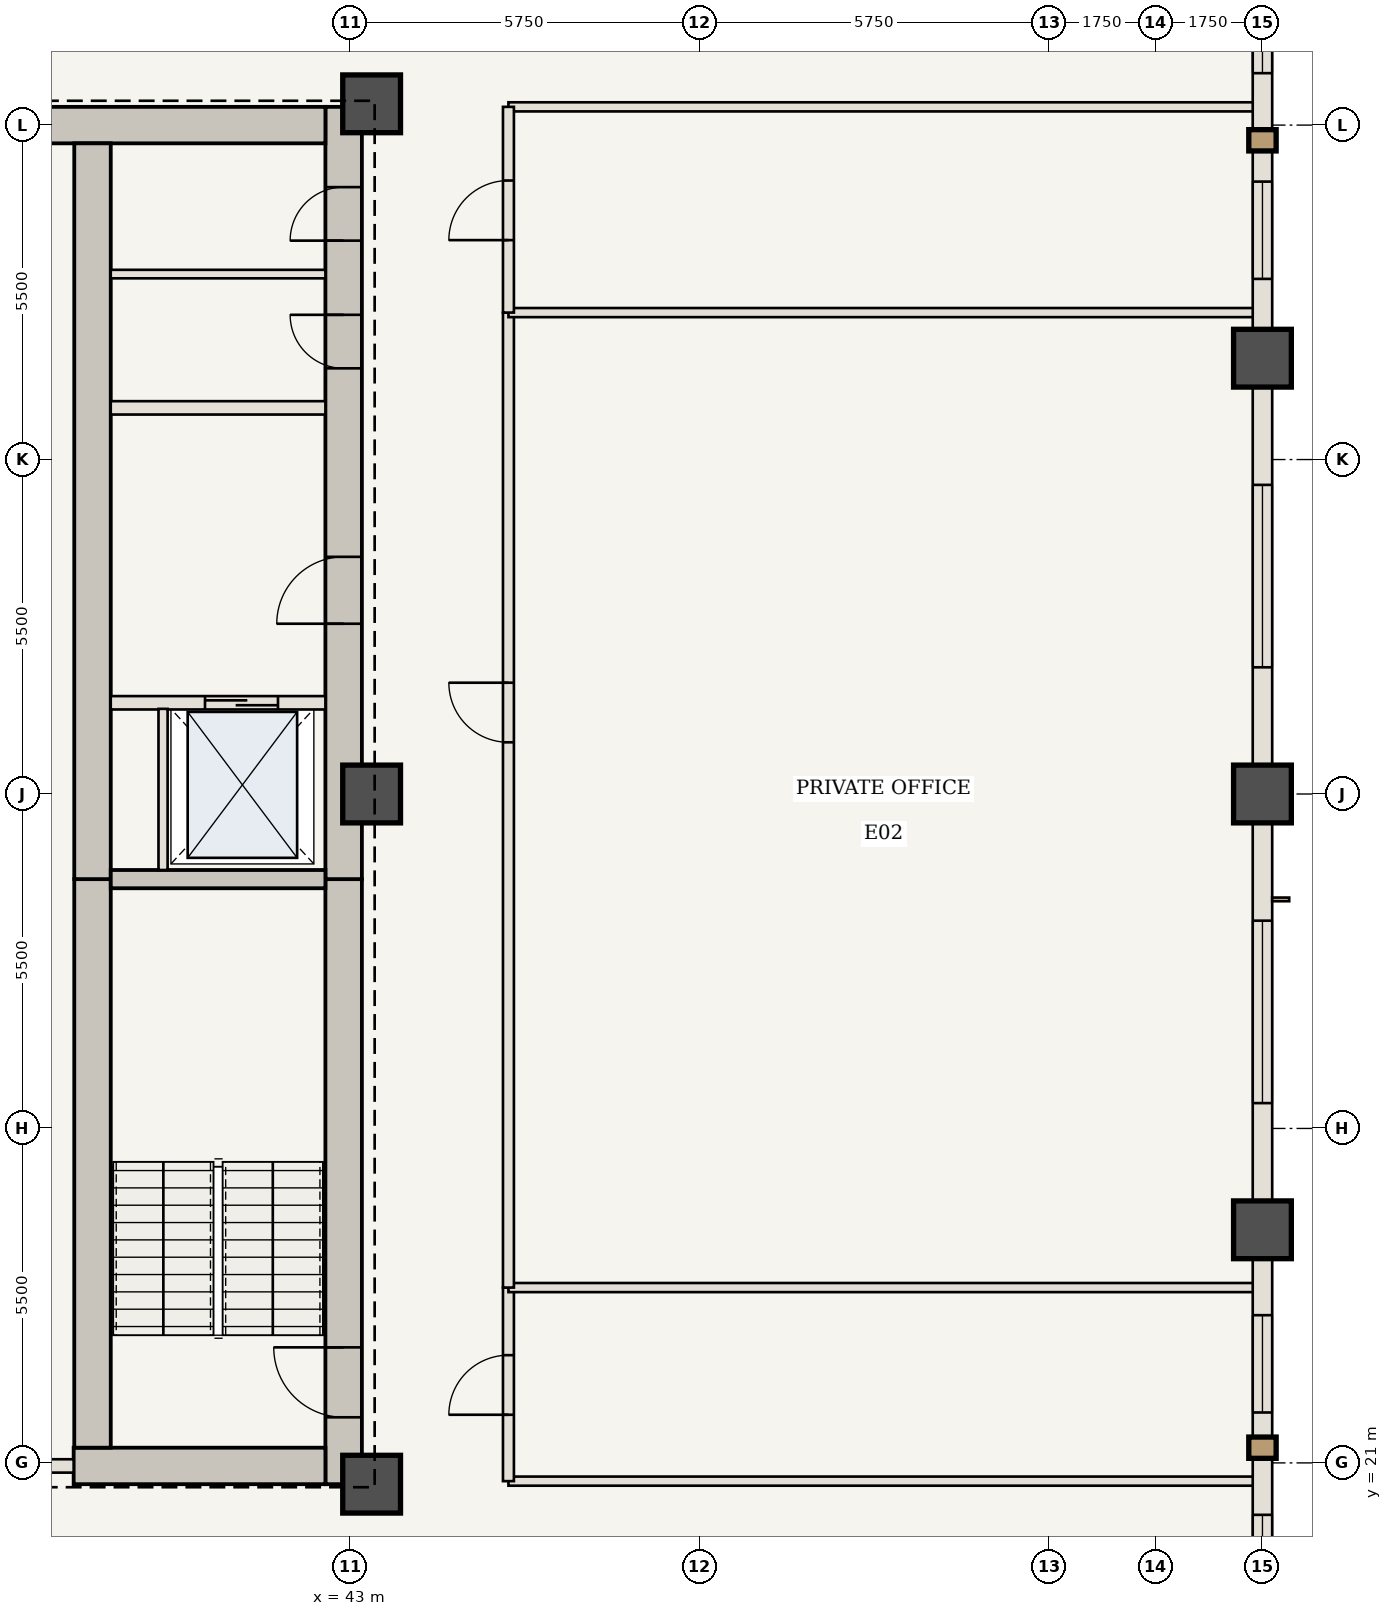
"""IFC4 building model, lengths in metres.
Left out: names, types, materials, properties, quantities, classifications, styles, units other than length and angle.
Written with IfcOpenShell. Run it as: python <this file> out.ifc"""

import sys

from ifc_helpers import new_model, si_unit, direction, frame, frame_2d, origin, origin_2d, place, context, subcontext, project, spatial, rectangle, extrude, element, fill, save


model = new_model("IFC4")
c1 = context("Model", 3, precision=1e-05, world=origin(), true_north=direction((0.0, 1.0)))
c2 = subcontext(c1, "Body", "Model", "MODEL_VIEW")
j1 = project(units=[si_unit("LENGTHUNIT", "METRE"), si_unit("PLANEANGLEUNIT", "RADIAN")], contexts=[c1])
p1 = place(None, origin())
s1 = spatial("IfcSite", under=j1, at=p1, CompositionType="ELEMENT")
p2 = place(p1, origin())
s2 = spatial("IfcBuilding", under=s1, at=p2, CompositionType="ELEMENT")
p3 = place(p2, frame((0.0, 0.0, 110.6)))
s3 = spatial("IfcBuildingStorey", under=s2, at=p3, CompositionType="ELEMENT", Elevation=110.6)
p4 = place(p3, frame((42.89, 20.65, 0.0), z_axis=(0.0, 0.0, 1.0), x_axis=(0.0, 1.0, 0.0)))
e1 = element("IfcWall", 1, at=p4, inside=s3, PredefinedType="SHEAR", context=c2, shape_type="SweptSolid", body=[
    extrude(rectangle(XDim=9.95, YDim=0.6, at=frame_2d((4.975, 0.0))), origin(), (0.0, 0.0, 1.0), 3.85),
])
p5 = place(p4, frame((1.1, 0.0, 0.0)))
e2 = element("IfcOpeningElement", 2, at=p5, cuts=e1, PredefinedType="OPENING", context=c2, shape_type="SweptSolid", body=[
    extrude(rectangle(XDim=1.15, YDim=2.15, at=frame_2d((0.575, 1.075))), frame((0.0, 0.31, 0.0), z_axis=(0.0, -1.0, 0.0), x_axis=(1.0, 0.0, 0.0)), (0.0, 0.0, 1.0), 0.62),
])
p6 = place(p3, frame((42.89, 30.6, 0.0), z_axis=(0.0, 0.0, 1.0), x_axis=(0.0, 1.0, 0.0)))
e3 = element("IfcWall", 3, at=p6, inside=s3, PredefinedType="SHEAR", context=c2, shape_type="SweptSolid", body=[
    extrude(rectangle(XDim=12.7, YDim=0.6, at=frame_2d((6.35, 0.0))), origin(), (0.0, 0.0, 1.0), 3.85),
])
p7 = place(p6, frame((4.2, 0.0, 0.0)))
e4 = element("IfcOpeningElement", 4, at=p7, cuts=e3, PredefinedType="OPENING", context=c2, shape_type="SweptSolid", body=[
    extrude(rectangle(XDim=1.1, YDim=2.15, at=frame_2d((0.55, 1.075))), frame((0.0, 0.31, 0.0), z_axis=(0.0, -1.0, 0.0), x_axis=(1.0, 0.0, 0.0)), (0.0, 0.0, 1.0), 0.62),
])
p8 = place(p6, frame((8.4, 0.0, 0.0)))
e5 = element("IfcOpeningElement", 5, at=p8, cuts=e3, PredefinedType="OPENING", context=c2, shape_type="SweptSolid", body=[
    extrude(rectangle(XDim=0.88, YDim=2.1, at=frame_2d((0.44, 1.05))), frame((0.0, 0.31, 0.0), z_axis=(0.0, -1.0, 0.0), x_axis=(1.0, 0.0, 0.0)), (0.0, 0.0, 1.0), 0.62),
])
p9 = place(p6, frame((10.5, 0.0, 0.0)))
e6 = element("IfcOpeningElement", 6, at=p9, cuts=e3, PredefinedType="OPENING", context=c2, shape_type="SweptSolid", body=[
    extrude(rectangle(XDim=0.88, YDim=2.1, at=frame_2d((0.44, 1.05))), frame((0.0, 0.31, 0.0), z_axis=(0.0, -1.0, 0.0), x_axis=(1.0, 0.0, 0.0)), (0.0, 0.0, 1.0), 0.62),
])
p10 = place(p3, frame((38.45, 20.95, 0.0), z_axis=(0.0, 0.0, 1.0), x_axis=(1.0, 0.0, 0.0)))
e7 = element("IfcWall", 7, at=p10, inside=s3, PredefinedType="SHEAR", context=c2, shape_type="SweptSolid", body=[
    extrude(rectangle(XDim=4.14, YDim=0.6, at=frame_2d((2.07, 0.0))), origin(), (0.0, 0.0, 1.0), 3.85),
])
p11 = place(p3, frame((37.75, 43.0, 0.0), z_axis=(0.0, 0.0, 1.0), x_axis=(1.0, 0.0, 0.0)))
e8 = element("IfcWall", 8, at=p11, inside=s3, PredefinedType="SHEAR", context=c2, shape_type="SweptSolid", body=[
    extrude(rectangle(XDim=4.84, YDim=0.6, at=frame_2d((2.42, 0.0))), origin(), (0.0, 0.0, 1.0), 3.85),
])
p12 = place(p3, frame((38.76, 21.25, 0.0), z_axis=(0.0, 0.0, 1.0), x_axis=(0.0, 1.0, 0.0)))
e9 = element("IfcWall", 9, at=p12, inside=s3, PredefinedType="SHEAR", context=c2, shape_type="SweptSolid", body=[
    extrude(rectangle(XDim=9.35, YDim=0.6, at=frame_2d((4.675, 0.0))), origin(), (0.0, 0.0, 1.0), 3.85),
])
p13 = place(p3, frame((38.76, 30.6, 0.0), z_axis=(0.0, 0.0, 1.0), x_axis=(0.0, 1.0, 0.0)))
e10 = element("IfcWall", 10, at=p13, inside=s3, PredefinedType="SHEAR", context=c2, shape_type="SweptSolid", body=[
    extrude(rectangle(XDim=12.1, YDim=0.6, at=frame_2d((6.05, 0.0))), origin(), (0.0, 0.0, 1.0), 3.85),
])
for number, where, z_axis, x_axis in (
    (11, (43.35, 20.65, 0.0), (0.0, 0.0, 1.0), (1.0, 0.0, 0.0)),
    (12, (43.35, 32.0, 0.0), (0.0, 0.0, 1.0), (1.0, 0.0, 0.0)),
    (13, (43.35, 43.35, 0.0), (0.0, 0.0, 1.0), (1.0, 0.0, 0.0)),
    (14, (58.0, 24.833, 0.0), (0.0, 0.0, 1.0), (1.0, 0.0, 0.0)),
    (15, (58.0, 32.0, 0.0), (0.0, 0.0, 1.0), (1.0, 0.0, 0.0)),
    (16, (58.0, 39.167, 0.0), (0.0, 0.0, 1.0), (1.0, 0.0, 0.0)),
):
    element("IfcColumn", number, at=place(p3, frame(where, z_axis=z_axis, x_axis=x_axis)), inside=s3, PredefinedType="COLUMN", context=c2, shape_type="SweptSolid", body=[
        extrude(rectangle(XDim=0.95, YDim=0.95, at=origin_2d()), origin(), (0.0, 0.0, 1.0), 3.85),
    ])
p14 = place(p3, frame((39.06, 30.6, 0.0), z_axis=(0.0, 0.0, 1.0), x_axis=(1.0, 0.0, 0.0)))
e17 = element("IfcWall", 17, at=p14, inside=s3, PredefinedType="SHEAR", context=c2, shape_type="SweptSolid", body=[
    extrude(rectangle(XDim=3.53, YDim=0.3, at=frame_2d((1.765, 0.0))), origin(), (0.0, 0.0, 1.0), 3.43),
])
p15 = place(p3, frame((39.06, 33.5, 0.0), z_axis=(0.0, 0.0, 1.0), x_axis=(1.0, 0.0, 0.0)))
e18 = element("IfcWall", 18, at=p15, inside=s3, PredefinedType="STANDARD", context=c2, shape_type="SweptSolid", body=[
    extrude(rectangle(XDim=3.53, YDim=0.22, at=frame_2d((1.765, 0.0))), origin(), (0.0, 0.0, 1.0), 3.43),
])
p16 = place(p15, frame((1.55, 0.0, 0.0)))
e19 = element("IfcOpeningElement", 19, at=p16, cuts=e18, PredefinedType="OPENING", context=c2, shape_type="SweptSolid", body=[
    extrude(rectangle(XDim=1.2, YDim=2.2, at=frame_2d((0.6, 1.1))), frame((0.0, 0.12, 0.0), z_axis=(0.0, -1.0, 0.0), x_axis=(1.0, 0.0, 0.0)), (0.0, 0.0, 1.0), 0.24),
])
p17 = place(p3, frame((39.92, 30.75, 0.0), z_axis=(0.0, 0.0, 1.0), x_axis=(0.0, 1.0, 0.0)))
e20 = element("IfcWall", 20, at=p17, inside=s3, PredefinedType="STANDARD", context=c2, shape_type="SweptSolid", body=[
    extrude(rectangle(XDim=2.65, YDim=0.15, at=frame_2d((1.325, 0.0))), origin(), (0.0, 0.0, 1.0), 3.43),
])
p18 = place(p3, frame((39.06, 38.35, 0.0), z_axis=(0.0, 0.0, 1.0), x_axis=(1.0, 0.0, 0.0)))
e21 = element("IfcWall", 21, at=p18, inside=s3, PredefinedType="STANDARD", context=c2, shape_type="SweptSolid", body=[
    extrude(rectangle(XDim=3.53, YDim=0.22, at=frame_2d((1.765, 0.0))), origin(), (0.0, 0.0, 1.0), 3.43),
])
p19 = place(p3, frame((39.06, 40.55, 0.0), z_axis=(0.0, 0.0, 1.0), x_axis=(1.0, 0.0, 0.0)))
e22 = element("IfcWall", 22, at=p19, inside=s3, PredefinedType="STANDARD", context=c2, shape_type="SweptSolid", body=[
    extrude(rectangle(XDim=3.53, YDim=0.14, at=frame_2d((1.765, 0.0))), origin(), (0.0, 0.0, 1.0), 3.43),
])
p20 = place(p3, frame((35.15, 20.95, 0.0), z_axis=(0.0, 0.0, 1.0), x_axis=(1.0, 0.0, 0.0)))
e23 = element("IfcWall", 23, at=p20, inside=s3, PredefinedType="STANDARD", context=c2, shape_type="SweptSolid", body=[
    extrude(rectangle(XDim=3.3, YDim=0.22, at=frame_2d((1.65, 0.0))), origin(), (0.0, 0.0, 1.0), 3.43),
])
p21 = place(p20, frame((1.1, 0.0, 0.0)))
e24 = element("IfcOpeningElement", 24, at=p21, cuts=e23, PredefinedType="OPENING", context=c2, shape_type="SweptSolid", body=[
    extrude(rectangle(XDim=1.1, YDim=2.15, at=frame_2d((0.55, 1.075))), frame((0.0, 0.12, 0.0), z_axis=(0.0, -1.0, 0.0), x_axis=(1.0, 0.0, 0.0)), (0.0, 0.0, 1.0), 0.24),
])
for number, where, z_axis, x_axis in (
    (25, (45.6, 20.7, 0.0), (0.0, 0.0, 1.0), (1.0, 0.0, 0.0)),
    (26, (45.6, 43.3, 0.0), (0.0, 0.0, 1.0), (1.0, 0.0, 0.0)),
):
    element("IfcWall", number, at=place(p3, frame(where, z_axis=z_axis, x_axis=x_axis)), inside=s3, PredefinedType="STANDARD", context=c2, shape_type="SweptSolid", body=[
        extrude(rectangle(XDim=12.34, YDim=0.15, at=frame_2d((6.17, 0.0))), origin(), (0.0, 0.0, 1.0), 2.81),
    ])
p22 = place(p3, frame((45.6, 20.7, 0.0), z_axis=(0.0, 0.0, 1.0), x_axis=(0.0, 1.0, 0.0)))
e27 = element("IfcWall", 27, at=p22, inside=s3, PredefinedType="STANDARD", context=c2, shape_type="SweptSolid", body=[
    extrude(rectangle(XDim=3.183, YDim=0.18, at=frame_2d((1.592, 0.0))), origin(), (0.0, 0.0, 1.0), 3.43),
])
p23 = place(p22, frame((1.092, 0.0, 0.0)))
e28 = element("IfcOpeningElement", 28, at=p23, cuts=e27, PredefinedType="OPENING", context=c2, shape_type="SweptSolid", body=[
    extrude(rectangle(XDim=0.98, YDim=2.2, at=frame_2d((0.49, 1.1))), frame((0.0, 0.1, 0.0), z_axis=(0.0, -1.0, 0.0), x_axis=(1.0, 0.0, 0.0)), (0.0, 0.0, 1.0), 0.2),
])
p24 = place(p3, frame((45.6, 23.883, 0.0), z_axis=(0.0, 0.0, 1.0), x_axis=(1.0, 0.0, 0.0)))
e29 = element("IfcWall", 29, at=p24, inside=s3, PredefinedType="STANDARD", context=c2, shape_type="SweptSolid", body=[
    extrude(rectangle(XDim=12.34, YDim=0.15, at=frame_2d((6.17, 0.0))), origin(), (0.0, 0.0, 1.0), 3.43),
])
p25 = place(p3, frame((45.6, 23.883, 0.0), z_axis=(0.0, 0.0, 1.0), x_axis=(0.0, 1.0, 0.0)))
e30 = element("IfcWall", 30, at=p25, inside=s3, PredefinedType="STANDARD", context=c2, shape_type="SweptSolid", body=[
    extrude(rectangle(XDim=16.033, YDim=0.18, at=frame_2d((8.017, 0.0))), origin(), (0.0, 0.0, 1.0), 3.43),
])
p26 = place(p25, frame((8.967, 0.0, 0.0)))
e31 = element("IfcOpeningElement", 31, at=p26, cuts=e30, PredefinedType="OPENING", context=c2, shape_type="SweptSolid", body=[
    extrude(rectangle(XDim=0.98, YDim=2.2, at=frame_2d((0.49, 1.1))), frame((0.0, 0.1, 0.0), z_axis=(0.0, -1.0, 0.0), x_axis=(1.0, 0.0, 0.0)), (0.0, 0.0, 1.0), 0.2),
])
p27 = place(p3, frame((45.6, 39.917, 0.0), z_axis=(0.0, 0.0, 1.0), x_axis=(1.0, 0.0, 0.0)))
e32 = element("IfcWall", 32, at=p27, inside=s3, PredefinedType="STANDARD", context=c2, shape_type="SweptSolid", body=[
    extrude(rectangle(XDim=12.34, YDim=0.15, at=frame_2d((6.17, 0.0))), origin(), (0.0, 0.0, 1.0), 3.43),
])
p28 = place(p3, frame((45.6, 39.917, 0.0), z_axis=(0.0, 0.0, 1.0), x_axis=(0.0, 1.0, 0.0)))
e33 = element("IfcWall", 33, at=p28, inside=s3, PredefinedType="STANDARD", context=c2, shape_type="SweptSolid", body=[
    extrude(rectangle(XDim=3.383, YDim=0.18, at=frame_2d((1.692, 0.0))), origin(), (0.0, 0.0, 1.0), 3.43),
])
p29 = place(p28, frame((1.192, 0.0, 0.0)))
e34 = element("IfcOpeningElement", 34, at=p29, cuts=e33, PredefinedType="OPENING", context=c2, shape_type="SweptSolid", body=[
    extrude(rectangle(XDim=0.98, YDim=2.2, at=frame_2d((0.49, 1.1))), frame((0.0, 0.1, 0.0), z_axis=(0.0, -1.0, 0.0), x_axis=(1.0, 0.0, 0.0)), (0.0, 0.0, 1.0), 0.2),
])
p30 = place(p3, frame((58.0, 24.833, 0.0), z_axis=(0.0, 0.0, 1.0), x_axis=(0.0, -1.0, 0.0)))
e35 = element("IfcWall", 35, at=p30, inside=s3, PredefinedType="USERDEFINED", context=c2, shape_type="SweptSolid", body=[
    extrude(rectangle(XDim=7.167, YDim=0.32, at=frame_2d((3.583, 0.0))), origin(), (0.0, 0.0, 1.0), 2.63),
])
p31 = place(p30, frame((1.404, 0.0, 0.85)))
e36 = element("IfcOpeningElement", 36, at=p31, cuts=e35, PredefinedType="OPENING", context=c2, shape_type="SweptSolid", body=[
    extrude(rectangle(XDim=1.6, YDim=1.58, at=frame_2d((0.8, 0.79))), frame((0.0, 0.17, 0.0), z_axis=(0.0, -1.0, 0.0), x_axis=(1.0, 0.0, 0.0)), (0.0, 0.0, 1.0), 0.34),
])
p32 = place(p30, frame((4.688, 0.0, 0.85)))
e37 = element("IfcOpeningElement", 37, at=p32, cuts=e35, PredefinedType="OPENING", context=c2, shape_type="SweptSolid", body=[
    extrude(rectangle(XDim=1.6, YDim=1.58, at=frame_2d((0.8, 0.79))), frame((0.0, 0.17, 0.0), z_axis=(0.0, -1.0, 0.0), x_axis=(1.0, 0.0, 0.0)), (0.0, 0.0, 1.0), 0.34),
])
p33 = place(p3, frame((58.0, 32.0, 0.0), z_axis=(0.0, 0.0, 1.0), x_axis=(0.0, -1.0, 0.0)))
e38 = element("IfcWall", 38, at=p33, inside=s3, PredefinedType="USERDEFINED", context=c2, shape_type="SweptSolid", body=[
    extrude(rectangle(XDim=7.167, YDim=0.32, at=frame_2d((3.583, 0.0))), origin(), (0.0, 0.0, 1.0), 2.63),
])
p34 = place(p33, frame((2.083, 0.0, 0.85)))
e39 = element("IfcOpeningElement", 39, at=p34, cuts=e38, PredefinedType="OPENING", context=c2, shape_type="SweptSolid", body=[
    extrude(rectangle(XDim=3.0, YDim=1.58, at=frame_2d((1.5, 0.79))), frame((0.0, 0.17, 0.0), z_axis=(0.0, -1.0, 0.0), x_axis=(1.0, 0.0, 0.0)), (0.0, 0.0, 1.0), 0.34),
])
p35 = place(p3, frame((58.0, 39.167, 0.0), z_axis=(0.0, 0.0, 1.0), x_axis=(0.0, -1.0, 0.0)))
e40 = element("IfcWall", 40, at=p35, inside=s3, PredefinedType="USERDEFINED", context=c2, shape_type="SweptSolid", body=[
    extrude(rectangle(XDim=7.167, YDim=0.32, at=frame_2d((3.583, 0.0))), origin(), (0.0, 0.0, 1.0), 2.63),
])
p36 = place(p35, frame((2.083, 0.0, 0.85)))
e41 = element("IfcOpeningElement", 41, at=p36, cuts=e40, PredefinedType="OPENING", context=c2, shape_type="SweptSolid", body=[
    extrude(rectangle(XDim=3.0, YDim=1.58, at=frame_2d((1.5, 0.79))), frame((0.0, 0.17, 0.0), z_axis=(0.0, -1.0, 0.0), x_axis=(1.0, 0.0, 0.0)), (0.0, 0.0, 1.0), 0.34),
])
p37 = place(p3, frame((58.0, 46.333, 0.0), z_axis=(0.0, 0.0, 1.0), x_axis=(0.0, -1.0, 0.0)))
e42 = element("IfcWall", 42, at=p37, inside=s3, PredefinedType="USERDEFINED", context=c2, shape_type="SweptSolid", body=[
    extrude(rectangle(XDim=7.167, YDim=0.32, at=frame_2d((3.583, 0.0))), origin(), (0.0, 0.0, 1.0), 2.63),
])
p38 = place(p37, frame((0.879, 0.0, 0.85)))
e43 = element("IfcOpeningElement", 43, at=p38, cuts=e42, PredefinedType="OPENING", context=c2, shape_type="SweptSolid", body=[
    extrude(rectangle(XDim=1.6, YDim=1.58, at=frame_2d((0.8, 0.79))), frame((0.0, 0.17, 0.0), z_axis=(0.0, -1.0, 0.0), x_axis=(1.0, 0.0, 0.0)), (0.0, 0.0, 1.0), 0.34),
])
p39 = place(p37, frame((4.262, 0.0, 0.85)))
e44 = element("IfcOpeningElement", 44, at=p39, cuts=e42, PredefinedType="OPENING", context=c2, shape_type="SweptSolid", body=[
    extrude(rectangle(XDim=1.6, YDim=1.58, at=frame_2d((0.8, 0.79))), frame((0.0, 0.17, 0.0), z_axis=(0.0, -1.0, 0.0), x_axis=(1.0, 0.0, 0.0)), (0.0, 0.0, 1.0), 0.34),
])
p40 = place(p5, origin())
e45 = element("IfcDoor", 45, at=p40, inside=s3, OperationType="SINGLE_SWING_RIGHT", PredefinedType="DOOR", context=c2, shape_type="SweptSolid", body=[
    extrude(rectangle(XDim=1.15, YDim=2.15, at=frame_2d((0.575, 1.075))), frame((0.0, 0.025, 0.0), z_axis=(0.0, -1.0, 0.0), x_axis=(1.0, 0.0, 0.0)), (0.0, 0.0, 1.0), 0.05),
])
fill(e2, e45)
p41 = place(p7, origin())
e46 = element("IfcDoor", 46, at=p41, inside=s3, OperationType="SINGLE_SWING_LEFT", PredefinedType="DOOR", context=c2, shape_type="SweptSolid", body=[
    extrude(rectangle(XDim=1.1, YDim=2.15, at=frame_2d((0.55, 1.075))), frame((0.0, 0.025, 0.0), z_axis=(0.0, -1.0, 0.0), x_axis=(1.0, 0.0, 0.0)), (0.0, 0.0, 1.0), 0.05),
])
fill(e4, e46)
p42 = place(p8, origin())
e47 = element("IfcDoor", 47, at=p42, inside=s3, OperationType="SINGLE_SWING_RIGHT", PredefinedType="DOOR", context=c2, shape_type="SweptSolid", body=[
    extrude(rectangle(XDim=0.88, YDim=2.1, at=frame_2d((0.44, 1.05))), frame((0.0, 0.025, 0.0), z_axis=(0.0, -1.0, 0.0), x_axis=(1.0, 0.0, 0.0)), (0.0, 0.0, 1.0), 0.05),
])
fill(e5, e47)
p43 = place(p9, origin())
e48 = element("IfcDoor", 48, at=p43, inside=s3, OperationType="SINGLE_SWING_LEFT", PredefinedType="DOOR", context=c2, shape_type="SweptSolid", body=[
    extrude(rectangle(XDim=0.88, YDim=2.1, at=frame_2d((0.44, 1.05))), frame((0.0, 0.025, 0.0), z_axis=(0.0, -1.0, 0.0), x_axis=(1.0, 0.0, 0.0)), (0.0, 0.0, 1.0), 0.05),
])
fill(e6, e48)
p44 = place(p16, origin())
e49 = element("IfcDoor", 49, at=p44, inside=s3, OperationType="DOUBLE_DOOR_SLIDING", PredefinedType="DOOR", context=c2, shape_type="SweptSolid", body=[
    extrude(rectangle(XDim=1.2, YDim=2.2, at=frame_2d((0.6, 1.1))), frame((0.0, 0.025, 0.0), z_axis=(0.0, -1.0, 0.0), x_axis=(1.0, 0.0, 0.0)), (0.0, 0.0, 1.0), 0.05),
])
fill(e19, e49)
p45 = place(p23, origin())
e50 = element("IfcDoor", 50, at=p45, inside=s3, OperationType="SINGLE_SWING_LEFT", PredefinedType="DOOR", context=c2, shape_type="SweptSolid", body=[
    extrude(rectangle(XDim=0.98, YDim=2.2, at=frame_2d((0.49, 1.1))), frame((0.0, 0.025, 0.0), z_axis=(0.0, -1.0, 0.0), x_axis=(1.0, 0.0, 0.0)), (0.0, 0.0, 1.0), 0.05),
])
fill(e28, e50)
p46 = place(p26, origin())
e51 = element("IfcDoor", 51, at=p46, inside=s3, OperationType="SINGLE_SWING_RIGHT", PredefinedType="DOOR", context=c2, shape_type="SweptSolid", body=[
    extrude(rectangle(XDim=0.98, YDim=2.2, at=frame_2d((0.49, 1.1))), frame((0.0, 0.025, 0.0), z_axis=(0.0, -1.0, 0.0), x_axis=(1.0, 0.0, 0.0)), (0.0, 0.0, 1.0), 0.05),
])
fill(e31, e51)
p47 = place(p29, origin())
e52 = element("IfcDoor", 52, at=p47, inside=s3, OperationType="SINGLE_SWING_LEFT", PredefinedType="DOOR", context=c2, shape_type="SweptSolid", body=[
    extrude(rectangle(XDim=0.98, YDim=2.2, at=frame_2d((0.49, 1.1))), frame((0.0, 0.025, 0.0), z_axis=(0.0, -1.0, 0.0), x_axis=(1.0, 0.0, 0.0)), (0.0, 0.0, 1.0), 0.05),
])
fill(e34, e52)
p48 = place(p31, origin())
e53 = element("IfcWindow", 53, at=p48, inside=s3, PartitioningType="SINGLE_PANEL", PredefinedType="WINDOW", context=c2, shape_type="SweptSolid", body=[
    extrude(rectangle(XDim=1.6, YDim=1.58, at=frame_2d((0.8, 0.79))), frame((0.0, 0.03, 0.0), z_axis=(0.0, -1.0, 0.0), x_axis=(1.0, 0.0, 0.0)), (0.0, 0.0, 1.0), 0.06),
])
fill(e36, e53)
p49 = place(p32, origin())
e54 = element("IfcWindow", 54, at=p49, inside=s3, PartitioningType="SINGLE_PANEL", PredefinedType="WINDOW", context=c2, shape_type="SweptSolid", body=[
    extrude(rectangle(XDim=1.6, YDim=1.58, at=frame_2d((0.8, 0.79))), frame((0.0, 0.03, 0.0), z_axis=(0.0, -1.0, 0.0), x_axis=(1.0, 0.0, 0.0)), (0.0, 0.0, 1.0), 0.06),
])
fill(e37, e54)
p50 = place(p34, origin())
e55 = element("IfcWindow", 55, at=p50, inside=s3, PartitioningType="SINGLE_PANEL", PredefinedType="WINDOW", context=c2, shape_type="SweptSolid", body=[
    extrude(rectangle(XDim=3.0, YDim=1.58, at=frame_2d((1.5, 0.79))), frame((0.0, 0.03, 0.0), z_axis=(0.0, -1.0, 0.0), x_axis=(1.0, 0.0, 0.0)), (0.0, 0.0, 1.0), 0.06),
])
fill(e39, e55)
p51 = place(p36, origin())
e56 = element("IfcWindow", 56, at=p51, inside=s3, PartitioningType="SINGLE_PANEL", PredefinedType="WINDOW", context=c2, shape_type="SweptSolid", body=[
    extrude(rectangle(XDim=3.0, YDim=1.58, at=frame_2d((1.5, 0.79))), frame((0.0, 0.03, 0.0), z_axis=(0.0, -1.0, 0.0), x_axis=(1.0, 0.0, 0.0)), (0.0, 0.0, 1.0), 0.06),
])
fill(e41, e56)
p52 = place(p38, origin())
e57 = element("IfcWindow", 57, at=p52, inside=s3, PartitioningType="SINGLE_PANEL", PredefinedType="WINDOW", context=c2, shape_type="SweptSolid", body=[
    extrude(rectangle(XDim=1.6, YDim=1.58, at=frame_2d((0.8, 0.79))), frame((0.0, 0.03, 0.0), z_axis=(0.0, -1.0, 0.0), x_axis=(1.0, 0.0, 0.0)), (0.0, 0.0, 1.0), 0.06),
])
fill(e43, e57)
p53 = place(p39, origin())
e58 = element("IfcWindow", 58, at=p53, inside=s3, PartitioningType="SINGLE_PANEL", PredefinedType="WINDOW", context=c2, shape_type="SweptSolid", body=[
    extrude(rectangle(XDim=1.6, YDim=1.58, at=frame_2d((0.8, 0.79))), frame((0.0, 0.03, 0.0), z_axis=(0.0, -1.0, 0.0), x_axis=(1.0, 0.0, 0.0)), (0.0, 0.0, 1.0), 0.06),
])
fill(e44, e58)
save(model, sys.argv[1])
